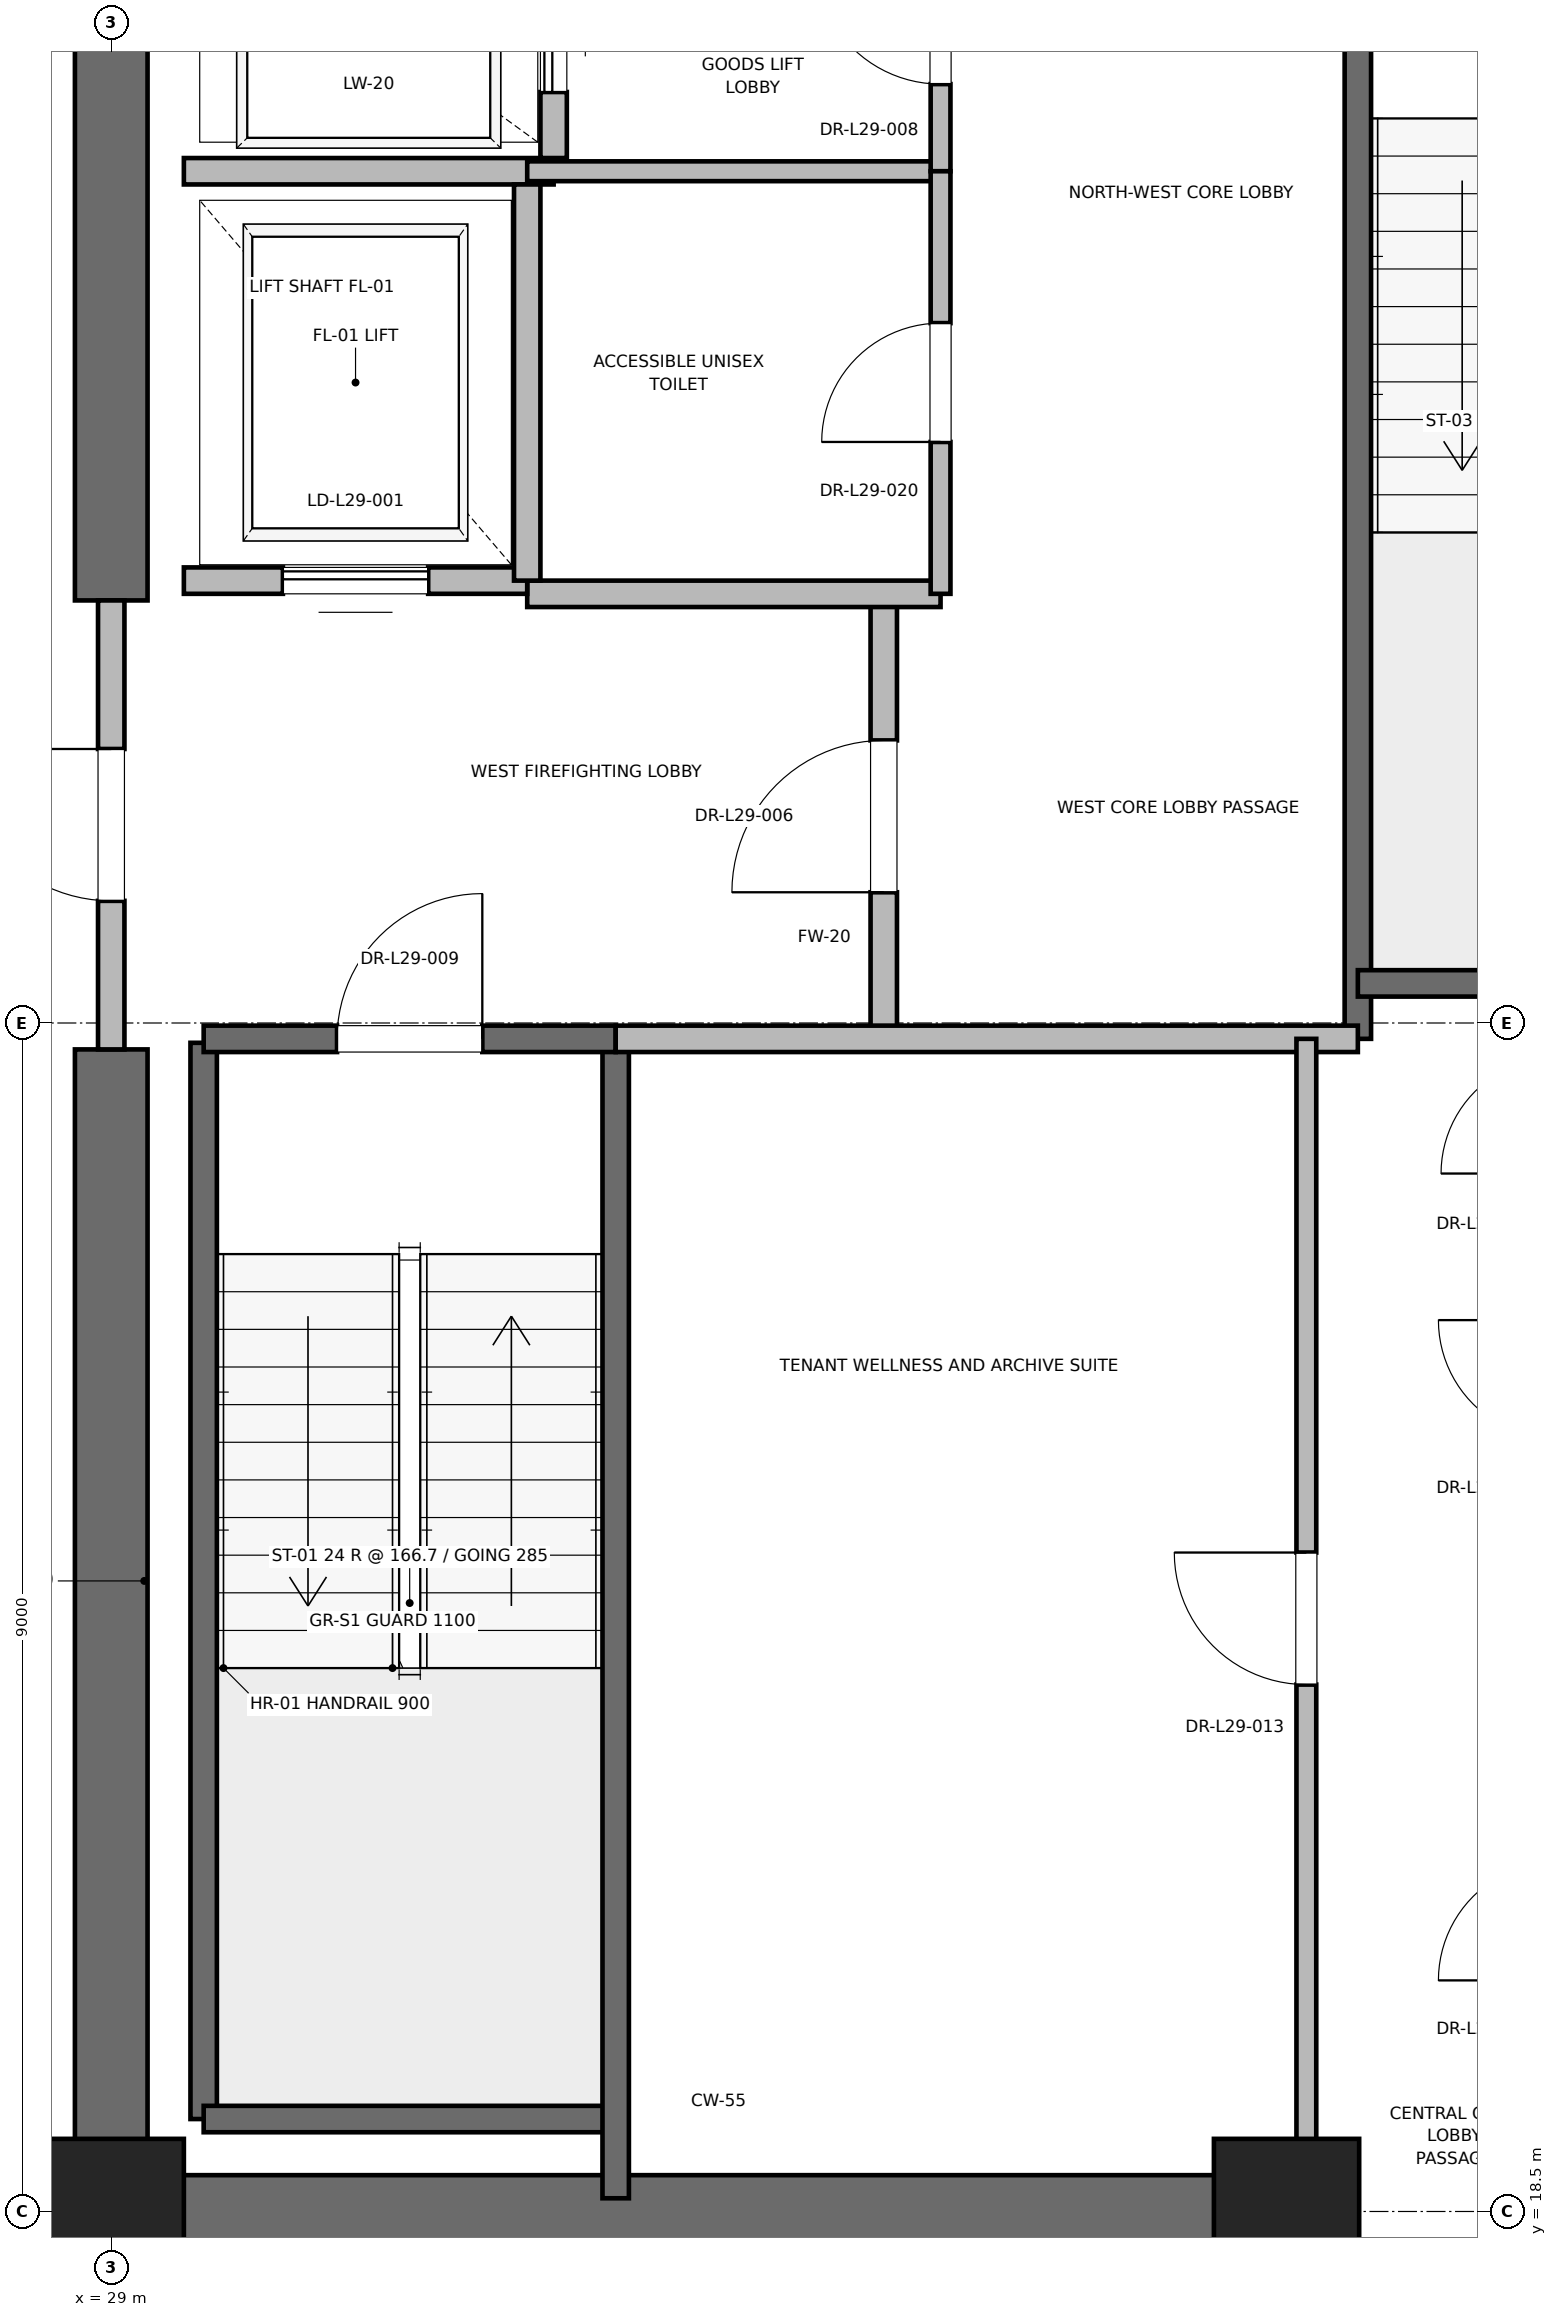
"""IFC4 building model, lengths in metres.
Left out: names, types, materials, properties, quantities, classifications, styles, units other than length and angle.
Written with IfcOpenShell. Run it as: python <this file> out.ifc"""

import sys

from ifc_helpers import new_model, si_unit, direction, frame, frame_2d, origin, origin_2d, place, context, subcontext, project, spatial, rectangle, extrude, element, fill, save


model = new_model("IFC4")
c1 = context("Model", 3, precision=1e-05, world=origin(), true_north=direction((0.0, 1.0)))
c2 = subcontext(c1, "Body", "Model", "MODEL_VIEW")
j1 = project(units=[si_unit("LENGTHUNIT", "METRE"), si_unit("PLANEANGLEUNIT", "RADIAN")], contexts=[c1])
p1 = place(None, origin())
s1 = spatial("IfcSite", under=j1, at=p1, CompositionType="ELEMENT")
p2 = place(p1, origin())
s2 = spatial("IfcBuilding", under=s1, at=p2, CompositionType="ELEMENT")
p3 = place(p2, frame((0.0, 0.0, 128.4)))
s3 = spatial("IfcBuildingStorey", under=s2, at=p3, CompositionType="ELEMENT", Elevation=128.4)
for number, where, z_axis, x_axis in (
    (1, (29.0, 18.5, 0.0), (0.0, 0.0, 1.0), (1.0, 0.0, 0.0)),
    (2, (37.9, 18.5, 0.0), (0.0, 0.0, 1.0), (1.0, 0.0, 0.0)),
):
    element("IfcColumn", number, at=place(p3, frame(where, z_axis=z_axis, x_axis=x_axis)), inside=s3, PredefinedType="PILASTER", context=c2, shape_type="SweptSolid", body=[
        extrude(rectangle(XDim=1.1, YDim=1.1, at=origin_2d()), origin(), (0.0, 0.0, 1.0), 4.0),
    ])
p4 = place(p3, frame((29.0, 18.5, 0.0), z_axis=(0.0, 0.0, 1.0), x_axis=(1.0, 0.0, 0.0)))
e3 = element("IfcWall", 3, at=p4, inside=s3, PredefinedType="SHEAR", context=c2, shape_type="SweptSolid", body=[
    extrude(rectangle(XDim=9.2, YDim=0.55, at=frame_2d((4.6, 0.0))), origin(), (0.0, 0.0, 1.0), 3.775),
])
p5 = place(p3, frame((29.0, 18.5, 0.0), z_axis=(0.0, 0.0, 1.0), x_axis=(0.0, 1.0, 0.0)))
e4 = element("IfcWall", 4, at=p5, inside=s3, PredefinedType="SHEAR", context=c2, shape_type="SweptSolid", body=[
    extrude(rectangle(XDim=8.8, YDim=0.55, at=frame_2d((4.4, 0.0))), origin(), (0.0, 0.0, 1.0), 3.775),
])
p6 = place(p3, frame((29.0, 30.7, 0.0), z_axis=(0.0, 0.0, 1.0), x_axis=(0.0, 1.0, 0.0)))
e5 = element("IfcWall", 5, at=p6, inside=s3, PredefinedType="SHEAR", context=c2, shape_type="SweptSolid", body=[
    extrude(rectangle(XDim=5.8, YDim=0.55, at=frame_2d((2.9, 0.0))), origin(), (0.0, 0.0, 1.0), 3.775),
])
p7 = place(p3, frame((29.7, 19.2, 0.0), z_axis=(0.0, 0.0, 1.0), x_axis=(0.0, 1.0, 0.0)))
e6 = element("IfcWall", 6, at=p7, inside=s3, PredefinedType="SOLIDWALL", context=c2, shape_type="SweptSolid", body=[
    extrude(rectangle(XDim=8.15, YDim=0.2, at=frame_2d((4.075, 0.0))), origin(), (0.0, 0.0, 1.0), 3.775),
])
p8 = place(p3, frame((29.7, 19.2, 0.0), z_axis=(0.0, 0.0, 1.0), x_axis=(1.0, 0.0, 0.0)))
e7 = element("IfcWall", 7, at=p8, inside=s3, PredefinedType="SOLIDWALL", context=c2, shape_type="SweptSolid", body=[
    extrude(rectangle(XDim=3.12, YDim=0.2, at=frame_2d((1.56, 0.0))), origin(), (0.0, 0.0, 1.0), 3.775),
])
p9 = place(p3, frame((32.82, 18.6, 0.0), z_axis=(0.0, 0.0, 1.0), x_axis=(0.0, 1.0, 0.0)))
e8 = element("IfcWall", 8, at=p9, inside=s3, PredefinedType="SOLIDWALL", context=c2, shape_type="SweptSolid", body=[
    extrude(rectangle(XDim=8.78, YDim=0.2, at=frame_2d((4.39, 0.0))), origin(), (0.0, 0.0, 1.0), 3.775),
])
p10 = place(p3, frame((29.7, 27.38, 0.0), z_axis=(0.0, 0.0, 1.0), x_axis=(1.0, 0.0, 0.0)))
e9 = element("IfcWall", 9, at=p10, inside=s3, PredefinedType="SOLIDWALL", context=c2, shape_type="SweptSolid", body=[
    extrude(rectangle(XDim=3.12, YDim=0.2, at=frame_2d((1.56, 0.0))), origin(), (0.0, 0.0, 1.0), 3.775),
])
p11 = place(p10, frame((1.01, 0.0, 0.0)))
e10 = element("IfcOpeningElement", 10, at=p11, cuts=e9, PredefinedType="OPENING", context=c2, shape_type="SweptSolid", body=[
    extrude(rectangle(XDim=1.1, YDim=2.15, at=frame_2d((0.55, 1.075))), frame((0.0, 0.1, 0.0), z_axis=(0.0, -1.0, 0.0), x_axis=(1.0, 0.0, 0.0)), (0.0, 0.0, 1.0), 0.2),
])
p12 = place(p3, frame((38.44, 27.38, 0.0), z_axis=(0.0, 0.0, 1.0), x_axis=(0.0, 1.0, 0.0)))
e11 = element("IfcWall", 11, at=p12, inside=s3, PredefinedType="SOLIDWALL", context=c2, shape_type="SweptSolid", body=[
    extrude(rectangle(XDim=8.87, YDim=0.2, at=frame_2d((4.435, 0.0))), origin(), (0.0, 0.0, 1.0), 3.775),
])
p13 = place(p3, frame((38.44, 27.8, 0.0), z_axis=(0.0, 0.0, 1.0), x_axis=(1.0, 0.0, 0.0)))
e12 = element("IfcWall", 12, at=p13, inside=s3, PredefinedType="SOLIDWALL", context=c2, shape_type="SweptSolid", body=[
    extrude(rectangle(XDim=3.32, YDim=0.2, at=frame_2d((1.66, 0.0))), origin(), (0.0, 0.0, 1.0), 3.775),
])
p14 = place(p3, frame((34.85, 27.38, 0.0), z_axis=(0.0, 0.0, 1.0), x_axis=(0.0, 1.0, 0.0)))
e13 = element("IfcWall", 13, at=p14, inside=s3, PredefinedType="PARTITIONING", context=c2, shape_type="SweptSolid", body=[
    extrude(rectangle(XDim=3.37, YDim=0.2, at=frame_2d((1.685, 0.0))), origin(), (0.0, 0.0, 1.0), 3.775),
])
p15 = place(p14, frame((1.11, 0.0, 0.0)))
e14 = element("IfcOpeningElement", 14, at=p15, cuts=e13, PredefinedType="OPENING", context=c2, shape_type="SweptSolid", body=[
    extrude(rectangle(XDim=1.15, YDim=2.2, at=frame_2d((0.575, 1.1))), frame((0.0, 0.1, 0.0), z_axis=(0.0, -1.0, 0.0), x_axis=(1.0, 0.0, 0.0)), (0.0, 0.0, 1.0), 0.2),
])
p16 = place(p3, frame((29.0, 27.3, 0.0), z_axis=(0.0, 0.0, 1.0), x_axis=(0.0, 1.0, 0.0)))
e15 = element("IfcWall", 15, at=p16, inside=s3, PredefinedType="PARTITIONING", context=c2, shape_type="SweptSolid", body=[
    extrude(rectangle(XDim=3.4, YDim=0.2, at=frame_2d((1.7, 0.0))), origin(), (0.0, 0.0, 1.0), 2.755),
])
p17 = place(p16, frame((1.125, 0.0, 0.0)))
e16 = element("IfcOpeningElement", 16, at=p17, cuts=e15, PredefinedType="OPENING", context=c2, shape_type="SweptSolid", body=[
    extrude(rectangle(XDim=1.15, YDim=2.2, at=frame_2d((0.575, 1.1))), frame((0.0, 0.1, 0.0), z_axis=(0.0, -1.0, 0.0), x_axis=(1.0, 0.0, 0.0)), (0.0, 0.0, 1.0), 0.2),
])
p18 = place(p3, frame((32.82, 27.38, 0.0), z_axis=(0.0, 0.0, 1.0), x_axis=(1.0, 0.0, 0.0)))
e17 = element("IfcWall", 17, at=p18, inside=s3, PredefinedType="PARTITIONING", context=c2, shape_type="SweptSolid", body=[
    extrude(rectangle(XDim=5.62, YDim=0.2, at=frame_2d((2.81, 0.0))), origin(), (0.0, 0.0, 1.0), 3.775),
])
p19 = place(p3, frame((32.15, 30.75, 0.0), z_axis=(0.0, 0.0, 1.0), x_axis=(1.0, 0.0, 0.0)))
e18 = element("IfcWall", 18, at=p19, inside=s3, PredefinedType="PARTITIONING", context=c2, shape_type="SweptSolid", body=[
    extrude(rectangle(XDim=3.13, YDim=0.2, at=frame_2d((1.565, 0.0))), origin(), (0.0, 0.0, 1.0), 3.775),
])
p20 = place(p3, frame((29.55, 30.85, 0.0), z_axis=(0.0, 0.0, 1.0), x_axis=(1.0, 0.0, 0.0)))
e19 = element("IfcWall", 19, at=p20, inside=s3, PredefinedType="SOLIDWALL", context=c2, shape_type="SweptSolid", body=[
    extrude(rectangle(XDim=2.6, YDim=0.2, at=frame_2d((1.3, 0.0))), origin(), (0.0, 0.0, 1.0), 2.755),
])
p21 = place(p20, frame((0.75, 0.0, 0.0)))
e20 = element("IfcOpeningElement", 20, at=p21, cuts=e19, PredefinedType="OPENING", context=c2, shape_type="SweptSolid", body=[
    extrude(rectangle(XDim=1.1, YDim=2.2, at=frame_2d((0.55, 1.1))), frame((0.0, 0.1, 0.0), z_axis=(0.0, -1.0, 0.0), x_axis=(1.0, 0.0, 0.0)), (0.0, 0.0, 1.0), 0.2),
])
p22 = place(p3, frame((29.55, 33.95, 0.0), z_axis=(0.0, 0.0, 1.0), x_axis=(1.0, 0.0, 0.0)))
e21 = element("IfcWall", 21, at=p22, inside=s3, PredefinedType="SOLIDWALL", context=c2, shape_type="SweptSolid", body=[
    extrude(rectangle(XDim=2.8, YDim=0.2, at=frame_2d((1.4, 0.0))), origin(), (0.0, 0.0, 1.0), 3.775),
])
p23 = place(p3, frame((32.15, 30.85, 0.0), z_axis=(0.0, 0.0, 1.0), x_axis=(0.0, 1.0, 0.0)))
e22 = element("IfcWall", 22, at=p23, inside=s3, PredefinedType="SOLIDWALL", context=c2, shape_type="SweptSolid", body=[
    extrude(rectangle(XDim=3.0, YDim=0.2, at=frame_2d((1.5, 0.0))), origin(), (0.0, 0.0, 1.0), 3.775),
])
p24 = place(p3, frame((32.35, 34.05, 0.0), z_axis=(0.0, 0.0, 1.0), x_axis=(0.0, 1.0, 0.0)))
e23 = element("IfcWall", 23, at=p24, inside=s3, PredefinedType="SOLIDWALL", context=c2, shape_type="SweptSolid", body=[
    extrude(rectangle(XDim=2.1, YDim=0.2, at=frame_2d((1.05, 0.0))), origin(), (0.0, 0.0, 1.0), 3.775),
])
p25 = place(p24, frame((0.5, 0.0, 0.0)))
e24 = element("IfcOpeningElement", 24, at=p25, cuts=e23, PredefinedType="OPENING", context=c2, shape_type="SweptSolid", body=[
    extrude(rectangle(XDim=1.1, YDim=2.2, at=frame_2d((0.55, 1.1))), frame((0.0, 0.1, 0.0), z_axis=(0.0, -1.0, 0.0), x_axis=(1.0, 0.0, 0.0)), (0.0, 0.0, 1.0), 0.2),
])
p26 = place(p3, frame((32.15, 33.95, 0.0), z_axis=(0.0, 0.0, 1.0), x_axis=(1.0, 0.0, 0.0)))
e25 = element("IfcWall", 25, at=p26, inside=s3, PredefinedType="PARTITIONING", context=c2, shape_type="SweptSolid", body=[
    extrude(rectangle(XDim=3.13, YDim=0.15, at=frame_2d((1.565, 0.0))), origin(), (0.0, 0.0, 1.0), 2.85),
])
p27 = place(p3, frame((35.28, 33.95, 0.0), z_axis=(0.0, 0.0, 1.0), x_axis=(0.0, 1.0, 0.0)))
e26 = element("IfcWall", 26, at=p27, inside=s3, PredefinedType="PARTITIONING", context=c2, shape_type="SweptSolid", body=[
    extrude(rectangle(XDim=2.27, YDim=0.15, at=frame_2d((1.135, 0.0))), origin(), (0.0, 0.0, 1.0), 2.755),
])
p28 = place(p27, frame((0.66, 0.0, 0.0)))
e27 = element("IfcOpeningElement", 27, at=p28, cuts=e26, PredefinedType="OPENING", context=c2, shape_type="SweptSolid", body=[
    extrude(rectangle(XDim=0.95, YDim=2.15, at=frame_2d((0.475, 1.075))), frame((0.0, 0.075, 0.0), z_axis=(0.0, -1.0, 0.0), x_axis=(1.0, 0.0, 0.0)), (0.0, 0.0, 1.0), 0.15),
])
p29 = place(p3, frame((35.28, 30.75, 0.0), z_axis=(0.0, 0.0, 1.0), x_axis=(0.0, 1.0, 0.0)))
e28 = element("IfcWall", 28, at=p29, inside=s3, PredefinedType="PARTITIONING", context=c2, shape_type="SweptSolid", body=[
    extrude(rectangle(XDim=3.2, YDim=0.15, at=frame_2d((1.6, 0.0))), origin(), (0.0, 0.0, 1.0), 2.85),
])
p30 = place(p29, frame((1.15, 0.0, 0.0)))
e29 = element("IfcOpeningElement", 29, at=p30, cuts=e28, PredefinedType="OPENING", context=c2, shape_type="SweptSolid", body=[
    extrude(rectangle(XDim=0.9, YDim=2.1, at=frame_2d((0.45, 1.05))), frame((0.0, 0.075, 0.0), z_axis=(0.0, -1.0, 0.0), x_axis=(1.0, 0.0, 0.0)), (0.0, 0.0, 1.0), 0.15),
])
p31 = place(p3, frame((38.05, 18.6, 0.0), z_axis=(0.0, 0.0, 1.0), x_axis=(0.0, 1.0, 0.0)))
e30 = element("IfcWall", 30, at=p31, inside=s3, PredefinedType="PARTITIONING", context=c2, shape_type="SweptSolid", body=[
    extrude(rectangle(XDim=8.78, YDim=0.15, at=frame_2d((4.39, 0.0))), origin(), (0.0, 0.0, 1.0), 2.755),
])
p32 = place(p31, frame((3.89, 0.0, 0.0)))
e31 = element("IfcOpeningElement", 31, at=p32, cuts=e30, PredefinedType="OPENING", context=c2, shape_type="SweptSolid", body=[
    extrude(rectangle(XDim=1.0, YDim=2.15, at=frame_2d((0.5, 1.075))), frame((0.0, 0.075, 0.0), z_axis=(0.0, -1.0, 0.0), x_axis=(1.0, 0.0, 0.0)), (0.0, 0.0, 1.0), 0.15),
])
p33 = place(p11, origin())
e32 = element("IfcDoor", 32, at=p33, inside=s3, OperationType="SINGLE_SWING_RIGHT", PredefinedType="DOOR", context=c2, shape_type="SweptSolid", body=[
    extrude(rectangle(XDim=1.1, YDim=2.15, at=frame_2d((0.55, 1.075))), frame((0.0, 0.025, 0.0), z_axis=(0.0, -1.0, 0.0), x_axis=(1.0, 0.0, 0.0)), (0.0, 0.0, 1.0), 0.05),
])
fill(e10, e32)
p34 = place(p15, origin())
e33 = element("IfcDoor", 33, at=p34, inside=s3, OperationType="SINGLE_SWING_LEFT", PredefinedType="DOOR", context=c2, shape_type="SweptSolid", body=[
    extrude(rectangle(XDim=1.15, YDim=2.2, at=frame_2d((0.575, 1.1))), frame((0.0, 0.025, 0.0), z_axis=(0.0, -1.0, 0.0), x_axis=(1.0, 0.0, 0.0)), (0.0, 0.0, 1.0), 0.05),
])
fill(e14, e33)
p35 = place(p17, origin())
e34 = element("IfcDoor", 34, at=p35, inside=s3, OperationType="SINGLE_SWING_RIGHT", PredefinedType="DOOR", context=c2, shape_type="SweptSolid", body=[
    extrude(rectangle(XDim=1.15, YDim=2.2, at=frame_2d((0.575, 1.1))), frame((0.0, 0.025, 0.0), z_axis=(0.0, -1.0, 0.0), x_axis=(1.0, 0.0, 0.0)), (0.0, 0.0, 1.0), 0.05),
])
fill(e16, e34)
p36 = place(p21, origin())
e35 = element("IfcDoor", 35, at=p36, inside=s3, OperationType="SLIDING_TO_RIGHT", PredefinedType="DOOR", context=c2, shape_type="SweptSolid", body=[
    extrude(rectangle(XDim=1.1, YDim=2.2, at=frame_2d((0.55, 1.1))), frame((0.0, 0.025, 0.0), z_axis=(0.0, -1.0, 0.0), x_axis=(1.0, 0.0, 0.0)), (0.0, 0.0, 1.0), 0.05),
])
fill(e20, e35)
p37 = place(p25, origin())
e36 = element("IfcDoor", 36, at=p37, inside=s3, OperationType="SLIDING_TO_RIGHT", PredefinedType="DOOR", context=c2, shape_type="SweptSolid", body=[
    extrude(rectangle(XDim=1.1, YDim=2.2, at=frame_2d((0.55, 1.1))), frame((0.0, 0.025, 0.0), z_axis=(0.0, -1.0, 0.0), x_axis=(1.0, 0.0, 0.0)), (0.0, 0.0, 1.0), 0.05),
])
fill(e24, e36)
p38 = place(p28, origin())
e37 = element("IfcDoor", 37, at=p38, inside=s3, OperationType="SINGLE_SWING_RIGHT", PredefinedType="DOOR", context=c2, shape_type="SweptSolid", body=[
    extrude(rectangle(XDim=0.95, YDim=2.15, at=frame_2d((0.475, 1.075))), frame((0.0, 0.025, 0.0), z_axis=(0.0, -1.0, 0.0), x_axis=(1.0, 0.0, 0.0)), (0.0, 0.0, 1.0), 0.05),
])
fill(e27, e37)
p39 = place(p30, origin())
e38 = element("IfcDoor", 38, at=p39, inside=s3, OperationType="SINGLE_SWING_LEFT", PredefinedType="DOOR", context=c2, shape_type="SweptSolid", body=[
    extrude(rectangle(XDim=0.9, YDim=2.1, at=frame_2d((0.45, 1.05))), frame((0.0, 0.025, 0.0), z_axis=(0.0, -1.0, 0.0), x_axis=(1.0, 0.0, 0.0)), (0.0, 0.0, 1.0), 0.05),
])
fill(e29, e38)
p40 = place(p32, origin())
e39 = element("IfcDoor", 39, at=p40, inside=s3, OperationType="SINGLE_SWING_RIGHT", PredefinedType="DOOR", context=c2, shape_type="SweptSolid", body=[
    extrude(rectangle(XDim=1.0, YDim=2.15, at=frame_2d((0.5, 1.075))), frame((0.0, 0.025, 0.0), z_axis=(0.0, -1.0, 0.0), x_axis=(1.0, 0.0, 0.0)), (0.0, 0.0, 1.0), 0.05),
])
fill(e31, e39)
save(model, sys.argv[1])
